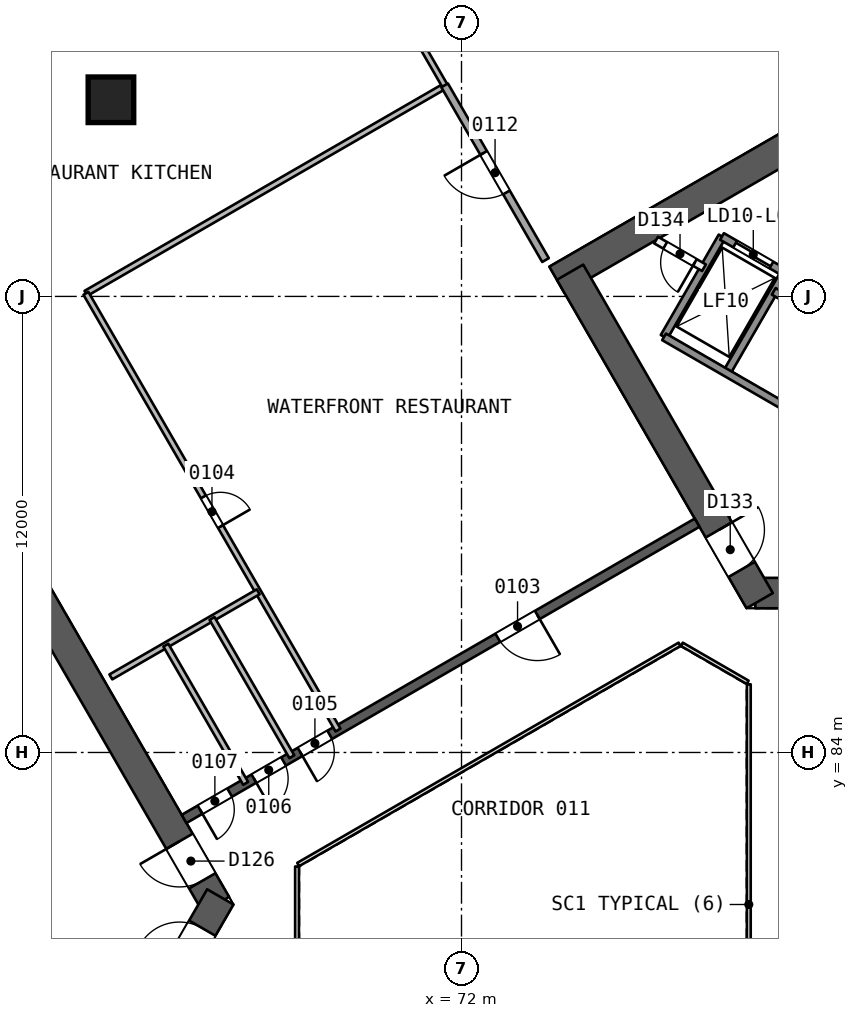
"""IFC4 building model, lengths in metres.
Left out: names, types, materials, properties, quantities, classifications, styles, units other than length and angle.
Written with IfcOpenShell. Run it as: python <this file> out.ifc"""

import sys

from ifc_helpers import new_model, si_unit, direction, frame, frame_2d, origin, origin_2d, place, context, subcontext, project, spatial, rectangle, extrude, element, fill, save


model = new_model("IFC4")
c1 = context("Model", 3, precision=1e-05, world=origin(), true_north=direction((0.0, 1.0)))
c2 = subcontext(c1, "Body", "Model", "MODEL_VIEW")
j1 = project(units=[si_unit("LENGTHUNIT", "METRE"), si_unit("PLANEANGLEUNIT", "RADIAN")], contexts=[c1])
p1 = place(None, origin())
s1 = spatial("IfcSite", under=j1, at=p1, CompositionType="ELEMENT")
p2 = place(p1, origin())
s2 = spatial("IfcBuilding", under=s1, at=p2, CompositionType="ELEMENT")
p3 = place(p2, frame((0.0, 0.0, 9.0)))
s3 = spatial("IfcBuildingStorey", under=s2, at=p3, CompositionType="ELEMENT", Elevation=9.0)
p4 = place(p3, frame((65.538, 80.0, 0.0), z_axis=(0.0, 0.0, 1.0), x_axis=(-0.49999662545, 0.866027352073, 0.0)))
e1 = element("IfcWall", 1, at=p4, inside=s3, PredefinedType="SHEAR", context=c2, shape_type="SweptSolid", body=[
    extrude(rectangle(XDim=10.149, YDim=0.8, at=frame_2d((5.074, 0.0))), origin(), (0.0, 0.0, 1.0), 6.0),
])
p5 = place(p4, frame((0.719, 0.0, 0.0)))
e2 = element("IfcOpeningElement", 2, at=p5, cuts=e1, PredefinedType="OPENING", context=c2, shape_type="SweptSolid", body=[
    extrude(rectangle(XDim=1.2, YDim=2.1, at=frame_2d((0.6, 1.05))), frame((0.0, 0.411, 0.0), z_axis=(0.0, -1.0, 0.0), x_axis=(1.0, 0.0, 0.0)), (0.0, 0.0, 1.0), 0.821),
])
p6 = place(p3, frame((60.664, 71.557, 0.0), z_axis=(0.0, 0.0, 1.0), x_axis=(0.50000409368, 0.866023040284, 0.0)))
e3 = element("IfcWall", 3, at=p6, inside=s3, PredefinedType="SHEAR", context=c2, shape_type="SweptSolid", body=[
    extrude(rectangle(XDim=9.98, YDim=0.8, at=frame_2d((4.99, 0.0))), origin(), (0.0, 0.0, 1.0), 6.0),
])
p7 = place(p6, frame((7.83, 0.0, 0.0)))
e4 = element("IfcOpeningElement", 4, at=p7, cuts=e3, PredefinedType="OPENING", context=c2, shape_type="SweptSolid", body=[
    extrude(rectangle(XDim=1.2, YDim=2.1, at=frame_2d((0.6, 1.05))), frame((0.0, 0.411, 0.0), z_axis=(0.0, -1.0, 0.0), x_axis=(1.0, 0.0, 0.0)), (0.0, 0.0, 1.0), 0.821),
])
p8 = place(p3, frame((79.731, 88.194, 0.0), z_axis=(0.0, 0.0, 1.0), x_axis=(1.0, 0.0, 0.0)))
e5 = element("IfcWall", 5, at=p8, inside=s3, PredefinedType="SHEAR", context=c2, shape_type="SweptSolid", body=[
    extrude(rectangle(XDim=10.149, YDim=0.8, at=frame_2d((5.074, 0.0))), origin(), (0.0, 0.0, 1.0), 6.0),
])
p9 = place(p8, frame((0.719, 0.0, 0.0)))
e6 = element("IfcOpeningElement", 6, at=p9, cuts=e5, PredefinedType="OPENING", context=c2, shape_type="SweptSolid", body=[
    extrude(rectangle(XDim=1.2, YDim=2.1, at=frame_2d((0.6, 1.05))), frame((0.0, 0.411, 0.0), z_axis=(0.0, -1.0, 0.0), x_axis=(1.0, 0.0, 0.0)), (0.0, 0.0, 1.0), 0.821),
])
p10 = place(p3, frame((86.723, 103.488, 0.0), z_axis=(0.0, 0.0, 1.0), x_axis=(-0.866032504327, -0.499987701298, 0.0)))
e7 = element("IfcWall", 7, at=p10, inside=s3, PredefinedType="SHEAR", context=c2, shape_type="SweptSolid", body=[
    extrude(rectangle(XDim=14.102, YDim=0.8, at=frame_2d((7.051, 0.0))), origin(), (0.0, 0.0, 1.0), 6.0),
])
p11 = place(p3, frame((74.856, 96.637, 0.0), z_axis=(0.0, 0.0, 1.0), x_axis=(0.499993500917, -0.866029155999, 0.0)))
e8 = element("IfcWall", 8, at=p11, inside=s3, PredefinedType="SHEAR", context=c2, shape_type="SweptSolid", body=[
    extrude(rectangle(XDim=9.98, YDim=0.8, at=frame_2d((4.99, 0.0))), origin(), (0.0, 0.0, 1.0), 6.0),
])
p12 = place(p11, frame((7.83, 0.0, 0.0)))
e9 = element("IfcOpeningElement", 9, at=p12, cuts=e8, PredefinedType="OPENING", context=c2, shape_type="SweptSolid", body=[
    extrude(rectangle(XDim=1.2, YDim=2.1, at=frame_2d((0.6, 1.05))), frame((0.0, 0.411, 0.0), z_axis=(0.0, -1.0, 0.0), x_axis=(1.0, 0.0, 0.0)), (0.0, 0.0, 1.0), 0.821),
])
p13 = place(p3, frame((78.2, 90.046, 0.0), z_axis=(0.0, 0.0, 1.0), x_axis=(-0.866026492143, -0.499998114903, 0.0)))
e10 = element("IfcWall", 10, at=p13, inside=s3, PredefinedType="SHEAR", context=c2, shape_type="SweptSolid", body=[
    extrude(rectangle(XDim=15.588, YDim=0.25, at=frame_2d((7.794, 0.0))), origin(), (0.0, 0.0, 1.0), 5.6),
])
p14 = place(p13, frame((4.856, 0.0, 0.0)))
e11 = element("IfcOpeningElement", 11, at=p14, cuts=e10, PredefinedType="OPENING", context=c2, shape_type="SweptSolid", body=[
    extrude(rectangle(XDim=1.2, YDim=2.4, at=frame_2d((0.6, 1.2))), frame((0.0, 0.135, 0.0), z_axis=(0.0, -1.0, 0.0), x_axis=(1.0, 0.0, 0.0)), (0.0, 0.0, 1.0), 0.271),
])
p15 = place(p13, frame((11.163, 0.0, 0.0)))
e12 = element("IfcOpeningElement", 12, at=p15, cuts=e10, PredefinedType="OPENING", context=c2, shape_type="SweptSolid", body=[
    extrude(rectangle(XDim=0.9, YDim=2.1, at=frame_2d((0.45, 1.05))), frame((0.0, 0.135, 0.0), z_axis=(0.0, -1.0, 0.0), x_axis=(1.0, 0.0, 0.0)), (0.0, 0.0, 1.0), 0.271),
])
p16 = place(p13, frame((12.566, 0.0, 0.0)))
e13 = element("IfcOpeningElement", 13, at=p16, cuts=e10, PredefinedType="OPENING", context=c2, shape_type="SweptSolid", body=[
    extrude(rectangle(XDim=0.9, YDim=2.1, at=frame_2d((0.45, 1.05))), frame((0.0, 0.135, 0.0), z_axis=(0.0, -1.0, 0.0), x_axis=(1.0, 0.0, 0.0)), (0.0, 0.0, 1.0), 0.271),
])
p17 = place(p13, frame((14.203, 0.0, 0.0)))
e14 = element("IfcOpeningElement", 14, at=p17, cuts=e10, PredefinedType="OPENING", context=c2, shape_type="SweptSolid", body=[
    extrude(rectangle(XDim=0.9, YDim=2.1, at=frame_2d((0.45, 1.05))), frame((0.0, 0.135, 0.0), z_axis=(0.0, -1.0, 0.0), x_axis=(1.0, 0.0, 0.0)), (0.0, 0.0, 1.0), 0.271),
])
p18 = place(p3, frame((62.763, 101.195, 0.0), z_axis=(0.010089088034, -0.017493176833, 0.999796078742), x_axis=(-0.499503863696, 0.866076260626, 0.020194081635)))
e15 = element("IfcColumn", 15, at=p18, inside=s3, PredefinedType="COLUMN", context=c2, shape_type="SweptSolid", body=[
    extrude(rectangle(XDim=1.2, YDim=1.2, at=origin_2d()), origin(), (0.0, 0.0, 1.0), 6.001),
])
p19 = place(p3, frame((71.566, 101.536, 0.0), z_axis=(0.0, 0.0, 1.0), x_axis=(-0.866017530991, -0.50001363583, 0.0)))
e16 = element("IfcWall", 16, at=p19, inside=s3, PredefinedType="PARTITIONING", context=c2, shape_type="SweptSolid", body=[
    extrude(rectangle(XDim=10.911, YDim=0.15, at=frame_2d((5.456, 0.0))), origin(), (0.0, 0.0, 1.0), 5.6),
])
p20 = place(p3, frame((62.117, 96.081, 0.0), z_axis=(0.0, 0.0, 1.0), x_axis=(0.49992899291, -0.866066395866, 0.0)))
e17 = element("IfcWall", 17, at=p20, inside=s3, PredefinedType="PARTITIONING", context=c2, shape_type="SweptSolid", body=[
    extrude(rectangle(XDim=13.268, YDim=0.15, at=frame_2d((6.634, 0.0))), origin(), (0.0, 0.0, 1.0), 5.6),
])
p21 = place(p20, frame((6.184, 0.0, 0.0)))
e18 = element("IfcOpeningElement", 18, at=p21, cuts=e17, PredefinedType="OPENING", context=c2, shape_type="SweptSolid", body=[
    extrude(rectangle(XDim=0.9, YDim=2.1, at=frame_2d((0.45, 1.05))), frame((0.0, 0.085, 0.0), z_axis=(0.0, -1.0, 0.0), x_axis=(1.0, 0.0, 0.0)), (0.0, 0.0, 1.0), 0.171),
])
p22 = place(p3, frame((74.21, 96.956, 0.0), z_axis=(0.0, 0.0, 1.0), x_axis=(-0.499991804824, 0.86603013522, 0.0)))
e19 = element("IfcWall", 19, at=p22, inside=s3, PredefinedType="PARTITIONING", context=c2, shape_type="SweptSolid", body=[
    extrude(rectangle(XDim=5.309, YDim=0.2, at=frame_2d((2.655, 0.0))), origin(), (0.0, 0.0, 1.0), 5.6),
])
p23 = place(p22, frame((2.055, 0.0, 0.0)))
e20 = element("IfcOpeningElement", 20, at=p23, cuts=e19, PredefinedType="OPENING", context=c2, shape_type="SweptSolid", body=[
    extrude(rectangle(XDim=1.2, YDim=2.4, at=frame_2d((0.6, 1.2))), frame((0.0, 0.11, 0.0), z_axis=(0.0, -1.0, 0.0), x_axis=(1.0, 0.0, 0.0)), (0.0, 0.0, 1.0), 0.221),
])
p24 = place(p3, frame((62.772, 85.989, 0.0), z_axis=(0.0, 0.0, 1.0), x_axis=(0.866013054227, 0.500021389451, 0.0)))
e21 = element("IfcWall", 21, at=p24, inside=s3, PredefinedType="PARTITIONING", context=c2, shape_type="SweptSolid", body=[
    extrude(rectangle(XDim=4.477, YDim=0.15, at=frame_2d((2.239, 0.0))), origin(), (0.0, 0.0, 1.0), 5.6),
])
p25 = place(p3, frame((71.576, 101.519, 0.0), z_axis=(0.0, 0.0, 1.0), x_axis=(-0.499942880228, 0.866058379388, 0.0)))
e22 = element("IfcWall", 22, at=p25, inside=s3, PredefinedType="PARTITIONING", context=c2, shape_type="SweptSolid", body=[
    extrude(rectangle(XDim=1.726, YDim=0.15, at=frame_2d((0.863, 0.0))), origin(), (0.0, 0.0, 1.0), 5.6),
])
for number, where, z_axis, x_axis in (
    (23, (65.435, 87.526, 0.0), (0.0, 0.0, 1.0), (0.5, -0.866, 0.0)),
    (24, (64.22, 86.824, 0.0), (0.0, 0.0, 1.0), (0.5, -0.866, 0.0)),
):
    element("IfcWall", number, at=place(p3, frame(where, z_axis=z_axis, x_axis=x_axis)), inside=s3, PredefinedType="PARTITIONING", context=c2, shape_type="SweptSolid", body=[
        extrude(rectangle(XDim=4.2, YDim=0.15, at=frame_2d((2.1, 0.0))), origin(), (0.0, 0.0, 1.0), 5.6),
    ])
for number, where, z_axis, x_axis in (
    (25, (78.976, 93.986, 0.0), (0.0, 0.0, 1.0), (0.5, 0.866, 0.0)),
    (26, (77.33, 94.936, 0.0), (0.0, 0.0, 1.0), (0.5, 0.866, 0.0)),
):
    element("IfcWall", number, at=place(p3, frame(where, z_axis=z_axis, x_axis=x_axis)), inside=s3, PredefinedType="SOLIDWALL", context=c2, shape_type="SweptSolid", body=[
        extrude(rectangle(XDim=3.05, YDim=0.2, at=frame_2d((1.525, 0.0))), origin(), (0.0, 0.0, 1.0), 5.6),
    ])
p26 = place(p3, frame((86.77, 89.486, 0.0), z_axis=(0.0, 0.0, 1.0), x_axis=(-0.86601811187, 0.500012629753, 0.0)))
e27 = element("IfcWall", 27, at=p26, inside=s3, PredefinedType="SOLIDWALL", context=c2, shape_type="SweptSolid", body=[
    extrude(rectangle(XDim=10.9, YDim=0.2, at=frame_2d((5.45, 0.0))), origin(), (0.0, 0.0, 1.0), 5.6),
])
p27 = place(p3, frame((78.38, 96.755, 0.0), z_axis=(0.0, 0.0, 1.0), x_axis=(-0.866003949776, 0.500037157592, 0.0)))
e28 = element("IfcWall", 28, at=p27, inside=s3, PredefinedType="PARTITIONING", context=c2, shape_type="SweptSolid", body=[
    extrude(rectangle(XDim=1.455, YDim=0.2, at=frame_2d((0.728, 0.0))), origin(), (0.0, 0.0, 1.0), 5.6),
])
p28 = place(p27, frame((0.278, 0.0, 0.0)))
e29 = element("IfcOpeningElement", 29, at=p28, cuts=e28, PredefinedType="OPENING", context=c2, shape_type="SweptSolid", body=[
    extrude(rectangle(XDim=0.9, YDim=2.1, at=frame_2d((0.45, 1.05))), frame((0.0, 0.11, 0.0), z_axis=(0.0, -1.0, 0.0), x_axis=(1.0, 0.0, 0.0)), (0.0, 0.0, 1.0), 0.221),
])
p29 = place(p3, frame((88.01, 91.634, 0.0), z_axis=(0.0, 0.0, 1.0), x_axis=(-0.866024315419, 0.5000018851, 0.0)))
e30 = element("IfcWall", 30, at=p29, inside=s3, PredefinedType="SOLIDWALL", context=c2, shape_type="SweptSolid", body=[
    extrude(rectangle(XDim=9.0, YDim=0.2, at=frame_2d((4.5, 0.0))), origin(), (0.0, 0.0, 1.0), 5.6),
])
p30 = place(p3, frame((80.5, 96.627, 0.0), z_axis=(0.0, 0.0, 1.0), x_axis=(-0.86601224135, 0.500022797313, 0.0)))
e31 = element("IfcWall", 31, at=p30, inside=s3, PredefinedType="SOLIDWALL", context=c2, shape_type="SweptSolid", body=[
    extrude(rectangle(XDim=1.9, YDim=0.2, at=frame_2d((0.95, 0.0))), origin(), (0.0, 0.0, 1.0), 5.6),
])
p31 = place(p30, frame((0.4, 0.0, 0.0)))
e32 = element("IfcOpeningElement", 32, at=p31, cuts=e31, PredefinedType="OPENING", context=c2, shape_type="SweptSolid", body=[
    extrude(rectangle(XDim=1.1, YDim=2.1, at=frame_2d((0.55, 1.05))), frame((0.0, 0.11, 0.0), z_axis=(0.0, -1.0, 0.0), x_axis=(1.0, 0.0, 0.0)), (0.0, 0.0, 1.0), 0.221),
])
p32 = place(p3, frame((79.56, 74.206, 0.0), z_axis=(0.0, 0.0, 1.0), x_axis=(0.0, 1.0, 0.0)))
e33 = element("IfcWall", 33, at=p32, inside=s3, PredefinedType="PARTITIONING", context=c2, shape_type="SweptSolid", body=[
    extrude(rectangle(XDim=11.588, YDim=0.1, at=frame_2d((5.794, 0.0))), origin(), (0.0, 0.0, 1.0), 5.6),
])
p33 = place(p3, frame((79.53, 85.846, 0.0), z_axis=(0.0, 0.0, 1.0), x_axis=(-0.866041268327, 0.499972520799, 0.0)))
e34 = element("IfcWall", 34, at=p33, inside=s3, PredefinedType="PARTITIONING", context=c2, shape_type="SweptSolid", body=[
    extrude(rectangle(XDim=2.0, YDim=0.1, at=frame_2d((1.0, 0.0))), origin(), (0.0, 0.0, 1.0), 5.6),
])
p34 = place(p3, frame((77.738, 86.846, 0.0), z_axis=(0.0, 0.0, 1.0), x_axis=(-0.866026658274, -0.499997827154, 0.0)))
e35 = element("IfcWall", 35, at=p34, inside=s3, PredefinedType="PARTITIONING", context=c2, shape_type="SweptSolid", body=[
    extrude(rectangle(XDim=11.588, YDim=0.1, at=frame_2d((5.794, 0.0))), origin(), (0.0, 0.0, 1.0), 5.6),
])
p35 = place(p3, frame((67.672, 81.0, 0.0), z_axis=(0.0, 0.0, 1.0), x_axis=(0.0, -1.0, 0.0)))
e36 = element("IfcWall", 36, at=p35, inside=s3, PredefinedType="PARTITIONING", context=c2, shape_type="SweptSolid", body=[
    extrude(rectangle(XDim=2.0, YDim=0.1, at=frame_2d((1.0, 0.0))), origin(), (0.0, 0.0, 1.0), 5.6),
])
p36 = place(p14, origin())
e37 = element("IfcDoor", 37, at=p36, inside=s3, OperationType="SINGLE_SWING_LEFT", PredefinedType="NOTDEFINED", context=c2, shape_type="SweptSolid", body=[
    extrude(rectangle(XDim=1.2, YDim=2.4, at=frame_2d((0.6, 1.2))), frame((0.0, 0.025, 0.0), z_axis=(0.0, -1.0, 0.0), x_axis=(1.0, 0.0, 0.0)), (0.0, 0.0, 1.0), 0.05),
])
fill(e11, e37)
p37 = place(p21, origin())
e38 = element("IfcDoor", 38, at=p37, inside=s3, OperationType="SINGLE_SWING_RIGHT", PredefinedType="NOTDEFINED", context=c2, shape_type="SweptSolid", body=[
    extrude(rectangle(XDim=0.9, YDim=2.1, at=frame_2d((0.45, 1.05))), frame((0.0, 0.025, 0.0), z_axis=(0.0, -1.0, 0.0), x_axis=(1.0, 0.0, 0.0)), (0.0, 0.0, 1.0), 0.05),
])
fill(e18, e38)
p38 = place(p15, origin())
e39 = element("IfcDoor", 39, at=p38, inside=s3, OperationType="SINGLE_SWING_RIGHT", PredefinedType="NOTDEFINED", context=c2, shape_type="SweptSolid", body=[
    extrude(rectangle(XDim=0.9, YDim=2.1, at=frame_2d((0.45, 1.05))), frame((0.0, 0.025, 0.0), z_axis=(0.0, -1.0, 0.0), x_axis=(1.0, 0.0, 0.0)), (0.0, 0.0, 1.0), 0.05),
])
fill(e12, e39)
p39 = place(p16, origin())
e40 = element("IfcDoor", 40, at=p39, inside=s3, OperationType="SINGLE_SWING_RIGHT", PredefinedType="NOTDEFINED", context=c2, shape_type="SweptSolid", body=[
    extrude(rectangle(XDim=0.9, YDim=2.1, at=frame_2d((0.45, 1.05))), frame((0.0, 0.025, 0.0), z_axis=(0.0, -1.0, 0.0), x_axis=(1.0, 0.0, 0.0)), (0.0, 0.0, 1.0), 0.05),
])
fill(e13, e40)
p40 = place(p17, origin())
e41 = element("IfcDoor", 41, at=p40, inside=s3, OperationType="SINGLE_SWING_RIGHT", PredefinedType="NOTDEFINED", context=c2, shape_type="SweptSolid", body=[
    extrude(rectangle(XDim=0.9, YDim=2.1, at=frame_2d((0.45, 1.05))), frame((0.0, 0.025, 0.0), z_axis=(0.0, -1.0, 0.0), x_axis=(1.0, 0.0, 0.0)), (0.0, 0.0, 1.0), 0.05),
])
fill(e14, e41)
p41 = place(p23, origin())
e42 = element("IfcDoor", 42, at=p41, inside=s3, OperationType="SINGLE_SWING_RIGHT", PredefinedType="NOTDEFINED", context=c2, shape_type="SweptSolid", body=[
    extrude(rectangle(XDim=1.2, YDim=2.4, at=frame_2d((0.6, 1.2))), frame((0.0, 0.025, 0.0), z_axis=(0.0, -1.0, 0.0), x_axis=(1.0, 0.0, 0.0)), (0.0, 0.0, 1.0), 0.05),
])
fill(e20, e42)
p42 = place(p5, origin())
e43 = element("IfcDoor", 43, at=p42, inside=s3, OperationType="SINGLE_SWING_RIGHT", PredefinedType="NOTDEFINED", context=c2, shape_type="SweptSolid", body=[
    extrude(rectangle(XDim=1.2, YDim=2.1, at=frame_2d((0.6, 1.05))), frame((0.0, 0.025, 0.0), z_axis=(0.0, -1.0, 0.0), x_axis=(1.0, 0.0, 0.0)), (0.0, 0.0, 1.0), 0.05),
])
fill(e2, e43)
p43 = place(p7, origin())
e44 = element("IfcDoor", 44, at=p43, inside=s3, OperationType="SINGLE_SWING_LEFT", PredefinedType="NOTDEFINED", context=c2, shape_type="SweptSolid", body=[
    extrude(rectangle(XDim=1.2, YDim=2.1, at=frame_2d((0.6, 1.05))), frame((0.0, 0.025, 0.0), z_axis=(0.0, -1.0, 0.0), x_axis=(1.0, 0.0, 0.0)), (0.0, 0.0, 1.0), 0.05),
])
fill(e4, e44)
p44 = place(p12, origin())
e45 = element("IfcDoor", 45, at=p44, inside=s3, OperationType="SINGLE_SWING_LEFT", PredefinedType="NOTDEFINED", context=c2, shape_type="SweptSolid", body=[
    extrude(rectangle(XDim=1.2, YDim=2.1, at=frame_2d((0.6, 1.05))), frame((0.0, 0.025, 0.0), z_axis=(0.0, -1.0, 0.0), x_axis=(1.0, 0.0, 0.0)), (0.0, 0.0, 1.0), 0.05),
])
fill(e9, e45)
p45 = place(p31, origin())
e46 = element("IfcDoor", 46, at=p45, inside=s3, OperationType="SLIDING_TO_RIGHT", PredefinedType="NOTDEFINED", context=c2, shape_type="SweptSolid", body=[
    extrude(rectangle(XDim=1.1, YDim=2.1, at=frame_2d((0.55, 1.05))), frame((0.0, 0.025, 0.0), z_axis=(0.0, -1.0, 0.0), x_axis=(1.0, 0.0, 0.0)), (0.0, 0.0, 1.0), 0.05),
])
fill(e32, e46)
p46 = place(p28, origin())
e47 = element("IfcDoor", 47, at=p46, inside=s3, OperationType="SINGLE_SWING_LEFT", PredefinedType="NOTDEFINED", context=c2, shape_type="SweptSolid", body=[
    extrude(rectangle(XDim=0.9, YDim=2.1, at=frame_2d((0.45, 1.05))), frame((0.0, 0.025, 0.0), z_axis=(0.0, -1.0, 0.0), x_axis=(1.0, 0.0, 0.0)), (0.0, 0.0, 1.0), 0.05),
])
fill(e29, e47)
save(model, sys.argv[1])
